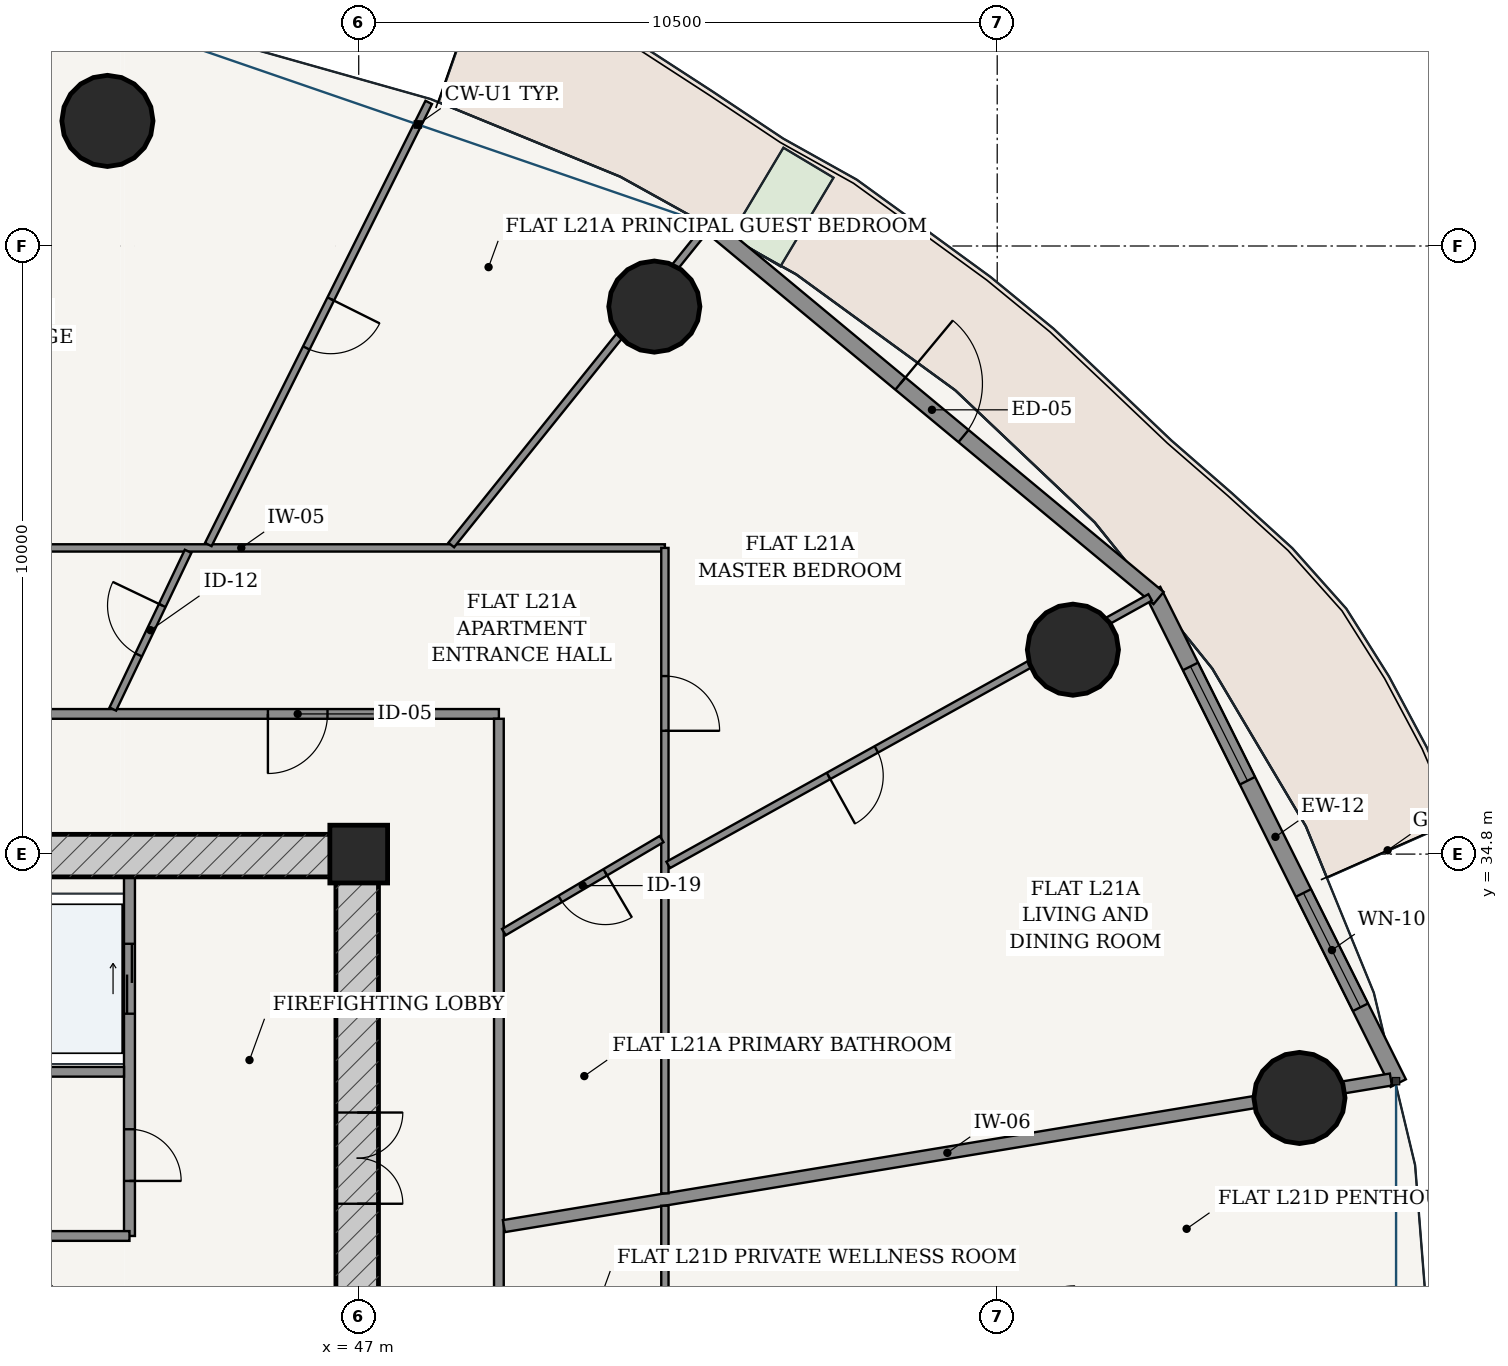
"""IFC4 building model, lengths in metres.
Left out: names, types, materials, properties, quantities, classifications, styles, units other than length and angle.
Written with IfcOpenShell. Run it as: python <this file> out.ifc"""

import sys

from ifc_helpers import new_model, si_unit, direction, frame, frame_2d, origin, origin_2d, place, context, subcontext, project, spatial, rectangle, hollow_circle, extrude, source, transform, mapped, element, fill, save


model = new_model("IFC4")
c1 = context("Model", 3, precision=1e-05, world=origin(), true_north=direction((-0.2419218956, 0.970295726276)))
c2 = subcontext(c1, "Body", "Model", "MODEL_VIEW")
j1 = project(units=[si_unit("LENGTHUNIT", "METRE"), si_unit("PLANEANGLEUNIT", "RADIAN")], contexts=[c1])
p1 = place(None, origin())
s1 = spatial("IfcSite", under=j1, at=p1, CompositionType="ELEMENT")
p2 = place(p1, origin())
s2 = spatial("IfcBuilding", under=s1, at=p2, CompositionType="ELEMENT")
p3 = place(p2, frame((0.0, 0.0, 83.4)))
s3 = spatial("IfcBuildingStorey", under=s2, at=p3, CompositionType="ELEMENT", Elevation=83.4)
p4 = place(p3, frame((47.0, 34.8, 0.0), z_axis=(0.0, 0.0, 1.0), x_axis=(1.0, 0.0, 0.0)))
e1 = element("IfcColumn", 1, at=p4, inside=s3, PredefinedType="COLUMN", context=c2, shape_type="SweptSolid", body=[
    extrude(rectangle(XDim=0.95, YDim=0.95, at=origin_2d()), origin(), (0.0, 0.0, 1.0), 3.6),
])
p5 = place(p3, frame((28.675, 34.775, 0.0), z_axis=(0.0, 0.0, 1.0), x_axis=(1.0, 0.0, 0.0)))
e2 = element("IfcWall", 2, at=p5, inside=s3, PredefinedType="SHEAR", context=c2, shape_type="SweptSolid", body=[
    extrude(rectangle(XDim=18.65, YDim=0.7, at=frame_2d((9.325, 0.0))), origin(), (0.0, 0.0, 1.0), 3.325),
])
p6 = place(p5, frame((6.837, 0.0, 0.0)))
e3 = element("IfcOpeningElement", 3, at=p6, cuts=e2, PredefinedType="OPENING", context=c2, shape_type="SweptSolid", body=[
    extrude(rectangle(XDim=0.85, YDim=2.1, at=frame_2d((0.425, 1.05))), frame((0.0, 0.36, 0.0), z_axis=(0.0, -1.0, 0.0), x_axis=(1.0, 0.0, 0.0)), (0.0, 0.0, 1.0), 0.72),
])
p7 = place(p5, frame((8.895, 0.0, 0.0)))
e4 = element("IfcOpeningElement", 4, at=p7, cuts=e2, PredefinedType="OPENING", context=c2, shape_type="SweptSolid", body=[
    extrude(rectangle(XDim=0.86, YDim=2.1, at=frame_2d((0.43, 1.05))), frame((0.0, 0.36, 0.0), z_axis=(0.0, -1.0, 0.0), x_axis=(1.0, 0.0, 0.0)), (0.0, 0.0, 1.0), 0.72),
])
p8 = place(p5, frame((10.962, 0.0, 0.0)))
e5 = element("IfcOpeningElement", 5, at=p8, cuts=e2, PredefinedType="OPENING", context=c2, shape_type="SweptSolid", body=[
    extrude(rectangle(XDim=0.85, YDim=2.1, at=frame_2d((0.425, 1.05))), frame((0.0, 0.36, 0.0), z_axis=(0.0, -1.0, 0.0), x_axis=(1.0, 0.0, 0.0)), (0.0, 0.0, 1.0), 0.72),
])
p9 = place(p3, frame((46.975, 19.175, 0.0), z_axis=(0.0, 0.0, 1.0), x_axis=(0.0, 1.0, 0.0)))
e6 = element("IfcWall", 6, at=p9, inside=s3, PredefinedType="SHEAR", context=c2, shape_type="SweptSolid", body=[
    extrude(rectangle(XDim=15.25, YDim=0.7, at=frame_2d((7.625, 0.0))), origin(), (0.0, 0.0, 1.0), 3.325),
])
p10 = place(p9, frame((9.875, 0.0, 0.0)))
e7 = element("IfcOpeningElement", 7, at=p10, cuts=e6, PredefinedType="OPENING", context=c2, shape_type="SweptSolid", body=[
    extrude(rectangle(XDim=1.5, YDim=2.2, at=frame_2d((0.75, 1.1))), frame((0.0, 0.36, 0.0), z_axis=(0.0, -1.0, 0.0), x_axis=(1.0, 0.0, 0.0)), (0.0, 0.0, 1.0), 0.72),
])
for number, where, z_axis, x_axis in (
    (8, (62.471, 30.79, 0.0), (0.0, 0.0, 1.0), (1.0, 0.0, 0.0)),
    (9, (58.745, 38.161, 0.0), (0.0, 0.0, 1.0), (1.0, 0.0, 0.0)),
    (10, (51.862, 43.803, 0.0), (0.0, 0.0, 1.0), (1.0, 0.0, 0.0)),
    (11, (42.867, 46.857, 0.0), (0.0, 0.0, 1.0), (1.0, 0.0, 0.0)),
):
    element("IfcColumn", number, at=place(p3, frame(where, z_axis=z_axis, x_axis=x_axis)), inside=s3, PredefinedType="COLUMN", context=c2, shape_type="SweptSolid", body=[
        extrude(hollow_circle(Radius=0.75, WallThickness=0.045, at=origin_2d()), origin(), (0.0, 0.0, 1.0), 3.6),
    ])
p11 = place(p3, frame((64.095, 31.034, 0.0), z_axis=(0.0, 0.0, 1.0), x_axis=(-0.446263788661, 0.894901464369, 0.0)))
e12 = element("IfcWall", 12, at=p11, inside=s3, PredefinedType="SOLIDWALL", context=c2, shape_type="SweptSolid", body=[
    extrude(rectangle(XDim=9.05, YDim=0.28, at=frame_2d((4.525, 0.0))), origin(), (0.0, 0.0, 1.0), 3.325),
])
p12 = place(p11, frame((1.394, 0.0, 0.85)))
e13 = element("IfcOpeningElement", 13, at=p12, cuts=e12, PredefinedType="OPENING", context=c2, shape_type="SweptSolid", body=[
    extrude(rectangle(XDim=2.1, YDim=1.95, at=frame_2d((1.05, 0.975))), frame((0.0, 0.15, 0.0), z_axis=(0.0, -1.0, 0.0), x_axis=(1.0, 0.0, 0.0)), (0.0, 0.0, 1.0), 0.3),
])
p13 = place(p11, frame((5.557, 0.0, 0.85)))
e14 = element("IfcOpeningElement", 14, at=p13, cuts=e12, PredefinedType="OPENING", context=c2, shape_type="SweptSolid", body=[
    extrude(rectangle(XDim=2.1, YDim=1.95, at=frame_2d((1.05, 0.975))), frame((0.0, 0.15, 0.0), z_axis=(0.0, -1.0, 0.0), x_axis=(1.0, 0.0, 0.0)), (0.0, 0.0, 1.0), 0.3),
])
p14 = place(p3, frame((60.154, 39.01, 0.0), z_axis=(0.0, 0.0, 1.0), x_axis=(-0.769242574941, 0.638956853706, 0.0)))
e15 = element("IfcWall", 15, at=p14, inside=s3, PredefinedType="SOLIDWALL", context=c2, shape_type="SweptSolid", body=[
    extrude(rectangle(XDim=9.69, YDim=0.26, at=frame_2d((4.845, 0.0))), origin(), (0.0, 0.0, 1.0), 3.325),
])
p15 = place(p14, frame((4.17, 0.0, 0.0)))
e16 = element("IfcOpeningElement", 16, at=p15, cuts=e15, PredefinedType="OPENING", context=c2, shape_type="SweptSolid", body=[
    extrude(rectangle(XDim=1.35, YDim=2.2, at=frame_2d((0.675, 1.1))), frame((0.0, 0.14, 0.0), z_axis=(0.0, -1.0, 0.0), x_axis=(1.0, 0.0, 0.0)), (0.0, 0.0, 1.0), 0.28),
])
p16 = place(p3, frame((43.23, 28.52, 0.0), z_axis=(0.0, 0.0, 1.0), x_axis=(0.0, 1.0, 0.0)))
e17 = element("IfcWall", 17, at=p16, inside=s3, PredefinedType="PARTITIONING", context=c2, shape_type="SweptSolid", body=[
    extrude(rectangle(XDim=5.905, YDim=0.18, at=frame_2d((2.953, 0.0))), origin(), (0.0, 0.0, 1.0), 3.325),
])
p17 = place(p16, frame((0.905, 0.0, 0.0)))
e18 = element("IfcOpeningElement", 18, at=p17, cuts=e17, PredefinedType="OPENING", context=c2, shape_type="SweptSolid", body=[
    extrude(rectangle(XDim=0.85, YDim=2.1, at=frame_2d((0.425, 1.05))), frame((0.0, 0.1, 0.0), z_axis=(0.0, -1.0, 0.0), x_axis=(1.0, 0.0, 0.0)), (0.0, 0.0, 1.0), 0.2),
])
p18 = place(p16, frame((3.655, 0.0, 0.0)))
e19 = element("IfcOpeningElement", 19, at=p18, cuts=e17, PredefinedType="OPENING", context=c2, shape_type="SweptSolid", body=[
    extrude(rectangle(XDim=1.15, YDim=2.2, at=frame_2d((0.575, 1.1))), frame((0.0, 0.1, 0.0), z_axis=(0.0, -1.0, 0.0), x_axis=(1.0, 0.0, 0.0)), (0.0, 0.0, 1.0), 0.2),
])
p19 = place(p3, frame((41.425, 31.22, 0.0), z_axis=(0.0, 0.0, 1.0), x_axis=(1.0, 0.0, 0.0)))
e20 = element("IfcWall", 20, at=p19, inside=s3, PredefinedType="PARTITIONING", context=c2, shape_type="SweptSolid", body=[
    extrude(rectangle(XDim=1.715, YDim=0.16, at=frame_2d((0.857, 0.0))), origin(), (0.0, 0.0, 1.0), 3.325),
])
p20 = place(p3, frame((41.425, 28.52, 0.0), z_axis=(0.0, 0.0, 1.0), x_axis=(1.0, 0.0, 0.0)))
e21 = element("IfcWall", 21, at=p20, inside=s3, PredefinedType="PARTITIONING", context=c2, shape_type="SweptSolid", body=[
    extrude(rectangle(XDim=1.805, YDim=0.16, at=frame_2d((0.902, 0.0))), origin(), (0.0, 0.0, 1.0), 3.325),
])
p21 = place(p3, frame((26.695, 37.105, 0.0), z_axis=(0.0, 0.0, 1.0), x_axis=(1.0, 0.0, 0.0)))
e22 = element("IfcWall", 22, at=p21, inside=s3, PredefinedType="PARTITIONING", context=c2, shape_type="SweptSolid", body=[
    extrude(rectangle(XDim=22.61, YDim=0.16, at=frame_2d((11.305, 0.0))), origin(), (0.0, 0.0, 1.0), 2.767),
])
p22 = place(p21, frame((18.812, 0.0, 0.0)))
e23 = element("IfcOpeningElement", 23, at=p22, cuts=e22, PredefinedType="OPENING", context=c2, shape_type="SweptSolid", body=[
    extrude(rectangle(XDim=0.98, YDim=2.2, at=frame_2d((0.49, 1.1))), frame((0.0, 0.09, 0.0), z_axis=(0.0, -1.0, 0.0), x_axis=(1.0, 0.0, 0.0)), (0.0, 0.0, 1.0), 0.18),
])
p23 = place(p21, frame((2.823, 0.0, 0.0)))
e24 = element("IfcOpeningElement", 24, at=p23, cuts=e22, PredefinedType="OPENING", context=c2, shape_type="SweptSolid", body=[
    extrude(rectangle(XDim=0.98, YDim=2.2, at=frame_2d((0.49, 1.1))), frame((0.0, 0.09, 0.0), z_axis=(0.0, -1.0, 0.0), x_axis=(1.0, 0.0, 0.0)), (0.0, 0.0, 1.0), 0.18),
])
p24 = place(p3, frame((49.305, 16.575, 0.0), z_axis=(0.0, 0.0, 1.0), x_axis=(0.0, 1.0, 0.0)))
e25 = element("IfcWall", 25, at=p24, inside=s3, PredefinedType="PARTITIONING", context=c2, shape_type="SweptSolid", body=[
    extrude(rectangle(XDim=20.45, YDim=0.16, at=frame_2d((10.225, 0.0))), origin(), (0.0, 0.0, 1.0), 2.767),
])
p25 = place(p24, frame((1.649, 0.0, 0.0)))
e26 = element("IfcOpeningElement", 26, at=p25, cuts=e25, PredefinedType="OPENING", context=c2, shape_type="SweptSolid", body=[
    extrude(rectangle(XDim=0.98, YDim=2.2, at=frame_2d((0.49, 1.1))), frame((0.0, 0.09, 0.0), z_axis=(0.0, -1.0, 0.0), x_axis=(1.0, 0.0, 0.0)), (0.0, 0.0, 1.0), 0.18),
])
p26 = place(p3, frame((49.387, 28.682, 0.0), z_axis=(0.0, 0.0, 1.0), x_axis=(0.986617934215, 0.163049231479, 0.0)))
e27 = element("IfcWall", 27, at=p26, inside=s3, PredefinedType="PARTITIONING", context=c2, shape_type="SweptSolid", body=[
    extrude(rectangle(XDim=14.785, YDim=0.2, at=frame_2d((7.392, 0.0))), origin(), (0.0, 0.0, 1.0), 2.767),
])
p27 = place(p3, frame((38.102, 39.835, 0.0), z_axis=(0.0, 0.0, 1.0), x_axis=(1.0, 0.0, 0.0)))
e28 = element("IfcWall", 28, at=p27, inside=s3, PredefinedType="PARTITIONING", context=c2, shape_type="SweptSolid", body=[
    extrude(rectangle(XDim=13.933, YDim=0.12, at=frame_2d((6.966, 0.0))), origin(), (0.0, 0.0, 1.0), 2.767),
])
p28 = place(p27, frame((2.769, 0.0, 0.0)))
e29 = element("IfcOpeningElement", 29, at=p28, cuts=e28, PredefinedType="OPENING", context=c2, shape_type="SweptSolid", body=[
    extrude(rectangle(XDim=0.9, YDim=2.15, at=frame_2d((0.45, 1.075))), frame((0.0, 0.07, 0.0), z_axis=(0.0, -1.0, 0.0), x_axis=(1.0, 0.0, 0.0)), (0.0, 0.0, 1.0), 0.14),
])
p29 = place(p3, frame((52.035, 39.835, 0.0), z_axis=(0.0, 0.0, 1.0), x_axis=(0.0, -1.0, 0.0)))
e30 = element("IfcWall", 30, at=p29, inside=s3, PredefinedType="PARTITIONING", context=c2, shape_type="SweptSolid", body=[
    extrude(rectangle(XDim=10.614, YDim=0.12, at=frame_2d((5.307, 0.0))), origin(), (0.0, 0.0, 1.0), 2.767),
])
p30 = place(p29, frame((2.107, 0.0, 0.0)))
e31 = element("IfcOpeningElement", 31, at=p30, cuts=e30, PredefinedType="OPENING", context=c2, shape_type="SweptSolid", body=[
    extrude(rectangle(XDim=0.9, YDim=2.15, at=frame_2d((0.45, 1.075))), frame((0.0, 0.07, 0.0), z_axis=(0.0, -1.0, 0.0), x_axis=(1.0, 0.0, 0.0)), (0.0, 0.0, 1.0), 0.14),
])
p31 = place(p3, frame((52.089, 34.622, 0.0), z_axis=(0.0, 0.0, 1.0), x_axis=(0.874324904351, 0.485341077626, 0.0)))
e32 = element("IfcWall", 32, at=p31, inside=s3, PredefinedType="PARTITIONING", context=c2, shape_type="SweptSolid", body=[
    extrude(rectangle(XDim=9.066, YDim=0.12, at=frame_2d((4.533, 0.0))), origin(), (0.0, 0.0, 1.0), 2.767),
])
p32 = place(p31, frame((3.016, 0.0, 0.0)))
e33 = element("IfcOpeningElement", 33, at=p32, cuts=e32, PredefinedType="OPENING", context=c2, shape_type="SweptSolid", body=[
    extrude(rectangle(XDim=0.9, YDim=2.15, at=frame_2d((0.45, 1.075))), frame((0.0, 0.07, 0.0), z_axis=(0.0, -1.0, 0.0), x_axis=(1.0, 0.0, 0.0)), (0.0, 0.0, 1.0), 0.14),
])
p33 = place(p3, frame((48.522, 39.883, 0.0), z_axis=(0.0, 0.0, 1.0), x_axis=(0.62672583251, 0.779239841682, 0.0)))
e34 = element("IfcWall", 34, at=p33, inside=s3, PredefinedType="PARTITIONING", context=c2, shape_type="SweptSolid", body=[
    extrude(rectangle(XDim=6.678, YDim=0.12, at=frame_2d((3.339, 0.0))), origin(), (0.0, 0.0, 1.0), 2.767),
])
p34 = place(p3, frame((44.526, 39.89, 0.0), z_axis=(0.0, 0.0, 1.0), x_axis=(0.446167584581, 0.894949432353, 0.0)))
e35 = element("IfcWall", 35, at=p34, inside=s3, PredefinedType="PARTITIONING", context=c2, shape_type="SweptSolid", body=[
    extrude(rectangle(XDim=8.125, YDim=0.12, at=frame_2d((4.062, 0.0))), origin(), (0.0, 0.0, 1.0), 2.767),
])
p35 = place(p34, frame((3.612, 0.0, 0.0)))
e36 = element("IfcOpeningElement", 36, at=p35, cuts=e35, PredefinedType="OPENING", context=c2, shape_type="SweptSolid", body=[
    extrude(rectangle(XDim=0.9, YDim=2.15, at=frame_2d((0.45, 1.075))), frame((0.0, 0.07, 0.0), z_axis=(0.0, -1.0, 0.0), x_axis=(1.0, 0.0, 0.0)), (0.0, 0.0, 1.0), 0.14),
])
p36 = place(p3, frame((49.387, 33.517, 0.0), z_axis=(0.0, 0.0, 1.0), x_axis=(0.861344081849, 0.508022019862, 0.0)))
e37 = element("IfcWall", 37, at=p36, inside=s3, PredefinedType="PARTITIONING", context=c2, shape_type="SweptSolid", body=[
    extrude(rectangle(XDim=3.013, YDim=0.12, at=frame_2d((1.506, 0.0))), origin(), (0.0, 0.0, 1.0), 3.325),
])
p37 = place(p36, frame((1.076, 0.0, 0.0)))
e38 = element("IfcOpeningElement", 38, at=p37, cuts=e37, PredefinedType="OPENING", context=c2, shape_type="SweptSolid", body=[
    extrude(rectangle(XDim=0.86, YDim=2.15, at=frame_2d((0.43, 1.075))), frame((0.0, 0.07, 0.0), z_axis=(0.0, -1.0, 0.0), x_axis=(1.0, 0.0, 0.0)), (0.0, 0.0, 1.0), 0.14),
])
p38 = place(p3, frame((42.956, 37.185, 0.0), z_axis=(0.0, 0.0, 1.0), x_axis=(0.430728013923, 0.902481788194, 0.0)))
e39 = element("IfcWall", 39, at=p38, inside=s3, PredefinedType="PARTITIONING", context=c2, shape_type="SweptSolid", body=[
    extrude(rectangle(XDim=2.874, YDim=0.12, at=frame_2d((1.437, 0.0))), origin(), (0.0, 0.0, 1.0), 3.325),
])
p39 = place(p38, frame((0.987, 0.0, 0.0)))
e40 = element("IfcOpeningElement", 40, at=p39, cuts=e39, PredefinedType="OPENING", context=c2, shape_type="SweptSolid", body=[
    extrude(rectangle(XDim=0.9, YDim=2.15, at=frame_2d((0.45, 1.075))), frame((0.0, 0.07, 0.0), z_axis=(0.0, -1.0, 0.0), x_axis=(1.0, 0.0, 0.0)), (0.0, 0.0, 1.0), 0.14),
])
p40 = place(p3, frame((52.035, 29.017, 0.0), z_axis=(0.0, 0.0, 1.0), x_axis=(0.0, -1.0, 0.0)))
e41 = element("IfcWall", 41, at=p40, inside=s3, PredefinedType="PARTITIONING", context=c2, shape_type="SweptSolid", body=[
    extrude(rectangle(XDim=15.252, YDim=0.12, at=frame_2d((7.626, 0.0))), origin(), (0.0, 0.0, 1.0), 2.767),
])
p41 = place(p40, frame((7.278, 0.0, 0.0)))
e42 = element("IfcOpeningElement", 42, at=p41, cuts=e41, PredefinedType="OPENING", context=c2, shape_type="SweptSolid", body=[
    extrude(rectangle(XDim=0.9, YDim=2.15, at=frame_2d((0.45, 1.075))), frame((0.0, 0.07, 0.0), z_axis=(0.0, -1.0, 0.0), x_axis=(1.0, 0.0, 0.0)), (0.0, 0.0, 1.0), 0.14),
])
m1 = source(origin(), c2, "Body", "SweptSolid", [
    extrude(rectangle(XDim=2.1, YDim=1.95, at=frame_2d((1.05, 0.975))), frame((0.0, 0.03, 0.0), z_axis=(0.0, -1.0, 0.0), x_axis=(1.0, 0.0, 0.0)), (0.0, 0.0, 1.0), 0.06),
])
p42 = place(p12, origin())
e43 = element("IfcWindow", 43, at=p42, inside=s3, PartitioningType="SINGLE_PANEL", PredefinedType="WINDOW", context=c2, shape_type="MappedRepresentation", body=[
    mapped(m1, transform((0.0, 0.0, 0.0), scale=1.0)),
])
fill(e13, e43)
p43 = place(p13, origin())
e44 = element("IfcWindow", 44, at=p43, inside=s3, PartitioningType="SINGLE_PANEL", PredefinedType="WINDOW", context=c2, shape_type="MappedRepresentation", body=[
    mapped(m1, transform((0.0, 0.0, 0.0), scale=1.0)),
])
fill(e14, e44)
m2 = source(origin(), c2, "Body", "SweptSolid", [
    extrude(rectangle(XDim=1.35, YDim=2.2, at=frame_2d((0.675, 1.1))), frame((0.0, 0.025, 0.0), z_axis=(0.0, -1.0, 0.0), x_axis=(1.0, 0.0, 0.0)), (0.0, 0.0, 1.0), 0.05),
])
p44 = place(p15, frame((1.35, 0.0, 0.0), z_axis=(0.0, 0.0, 1.0), x_axis=(-1.0, 0.0, 0.0)))
e45 = element("IfcDoor", 45, at=p44, inside=s3, OperationType="SINGLE_SWING_LEFT", PredefinedType="DOOR", context=c2, shape_type="MappedRepresentation", body=[
    mapped(m2, transform((0.0, 0.0, 0.0), scale=1.0)),
])
fill(e16, e45)
m3 = source(origin(), c2, "Body", "SweptSolid", [
    extrude(rectangle(XDim=1.5, YDim=2.2, at=frame_2d((0.75, 1.1))), frame((0.0, 0.025, 0.0), z_axis=(0.0, -1.0, 0.0), x_axis=(1.0, 0.0, 0.0)), (0.0, 0.0, 1.0), 0.05),
])
p45 = place(p10, frame((1.5, 0.0, 0.0), z_axis=(0.0, 0.0, 1.0), x_axis=(-1.0, 0.0, 0.0)))
e46 = element("IfcDoor", 46, at=p45, inside=s3, OperationType="DOUBLE_DOOR_SINGLE_SWING", PredefinedType="DOOR", context=c2, shape_type="MappedRepresentation", body=[
    mapped(m3, transform((0.0, 0.0, 0.0), scale=1.0)),
])
fill(e7, e46)
m4 = source(origin(), c2, "Body", "SweptSolid", [
    extrude(rectangle(XDim=0.85, YDim=2.1, at=frame_2d((0.425, 1.05))), frame((0.0, 0.025, 0.0), z_axis=(0.0, -1.0, 0.0), x_axis=(1.0, 0.0, 0.0)), (0.0, 0.0, 1.0), 0.05),
])
p46 = place(p17, frame((0.85, 0.0, 0.0), z_axis=(0.0, 0.0, 1.0), x_axis=(-1.0, 0.0, 0.0)))
e47 = element("IfcDoor", 47, at=p46, inside=s3, OperationType="SINGLE_SWING_RIGHT", PredefinedType="DOOR", context=c2, shape_type="MappedRepresentation", body=[
    mapped(m4, transform((0.0, 0.0, 0.0), scale=1.0)),
])
fill(e18, e47)
m5 = source(origin(), c2, "Body", "SweptSolid", [
    extrude(rectangle(XDim=1.15, YDim=2.2, at=frame_2d((0.575, 1.1))), frame((0.0, 0.025, 0.0), z_axis=(0.0, -1.0, 0.0), x_axis=(1.0, 0.0, 0.0)), (0.0, 0.0, 1.0), 0.05),
])
p47 = place(p18, origin())
e48 = element("IfcDoor", 48, at=p47, inside=s3, OperationType="DOUBLE_DOOR_SLIDING", PredefinedType="DOOR", context=c2, shape_type="MappedRepresentation", body=[
    mapped(m5, transform((0.0, 0.0, 0.0), scale=1.0)),
])
fill(e19, e48)
m6 = source(origin(), c2, "Body", "SweptSolid", [
    extrude(rectangle(XDim=0.98, YDim=2.2, at=frame_2d((0.49, 1.1))), frame((0.0, 0.025, 0.0), z_axis=(0.0, -1.0, 0.0), x_axis=(1.0, 0.0, 0.0)), (0.0, 0.0, 1.0), 0.05),
])
p48 = place(p22, frame((0.98, 0.0, 0.0), z_axis=(0.0, 0.0, 1.0), x_axis=(-1.0, 0.0, 0.0)))
e49 = element("IfcDoor", 49, at=p48, inside=s3, OperationType="SINGLE_SWING_RIGHT", PredefinedType="DOOR", context=c2, shape_type="MappedRepresentation", body=[
    mapped(m6, transform((0.0, 0.0, 0.0), scale=1.0)),
])
fill(e23, e49)
m7 = source(origin(), c2, "Body", "SweptSolid", [
    extrude(rectangle(XDim=0.86, YDim=2.15, at=frame_2d((0.43, 1.075))), frame((0.0, 0.025, 0.0), z_axis=(0.0, -1.0, 0.0), x_axis=(1.0, 0.0, 0.0)), (0.0, 0.0, 1.0), 0.05),
])
p49 = place(p37, frame((0.86, 0.0, 0.0), z_axis=(0.0, 0.0, 1.0), x_axis=(-1.0, 0.0, 0.0)))
e50 = element("IfcDoor", 50, at=p49, inside=s3, OperationType="SINGLE_SWING_LEFT", PredefinedType="DOOR", context=c2, shape_type="MappedRepresentation", body=[
    mapped(m7, transform((0.0, 0.0, 0.0), scale=1.0)),
])
fill(e38, e50)
m8 = source(origin(), c2, "Body", "SweptSolid", [
    extrude(rectangle(XDim=0.9, YDim=2.15, at=frame_2d((0.45, 1.075))), frame((0.0, 0.025, 0.0), z_axis=(0.0, -1.0, 0.0), x_axis=(1.0, 0.0, 0.0)), (0.0, 0.0, 1.0), 0.05),
])
p50 = place(p39, origin())
e51 = element("IfcDoor", 51, at=p50, inside=s3, OperationType="SINGLE_SWING_RIGHT", PredefinedType="DOOR", context=c2, shape_type="MappedRepresentation", body=[
    mapped(m8, transform((0.0, 0.0, 0.0), scale=1.0)),
])
fill(e40, e51)
p51 = place(p30, origin())
e52 = element("IfcDoor", 52, at=p51, inside=s3, OperationType="SINGLE_SWING_RIGHT", PredefinedType="DOOR", context=c2, shape_type="MappedRepresentation", body=[
    mapped(m8, transform((0.0, 0.0, 0.0), scale=1.0)),
])
fill(e31, e52)
p52 = place(p35, frame((0.9, 0.0, 0.0), z_axis=(0.0, 0.0, 1.0), x_axis=(-1.0, 0.0, 0.0)))
e53 = element("IfcDoor", 53, at=p52, inside=s3, OperationType="SINGLE_SWING_LEFT", PredefinedType="DOOR", context=c2, shape_type="MappedRepresentation", body=[
    mapped(m8, transform((0.0, 0.0, 0.0), scale=1.0)),
])
fill(e36, e53)
p53 = place(p32, frame((0.9, 0.0, 0.0), z_axis=(0.0, 0.0, 1.0), x_axis=(-1.0, 0.0, 0.0)))
e54 = element("IfcDoor", 54, at=p53, inside=s3, OperationType="SINGLE_SWING_RIGHT", PredefinedType="DOOR", context=c2, shape_type="MappedRepresentation", body=[
    mapped(m8, transform((0.0, 0.0, 0.0), scale=1.0)),
])
fill(e33, e54)
save(model, sys.argv[1])
